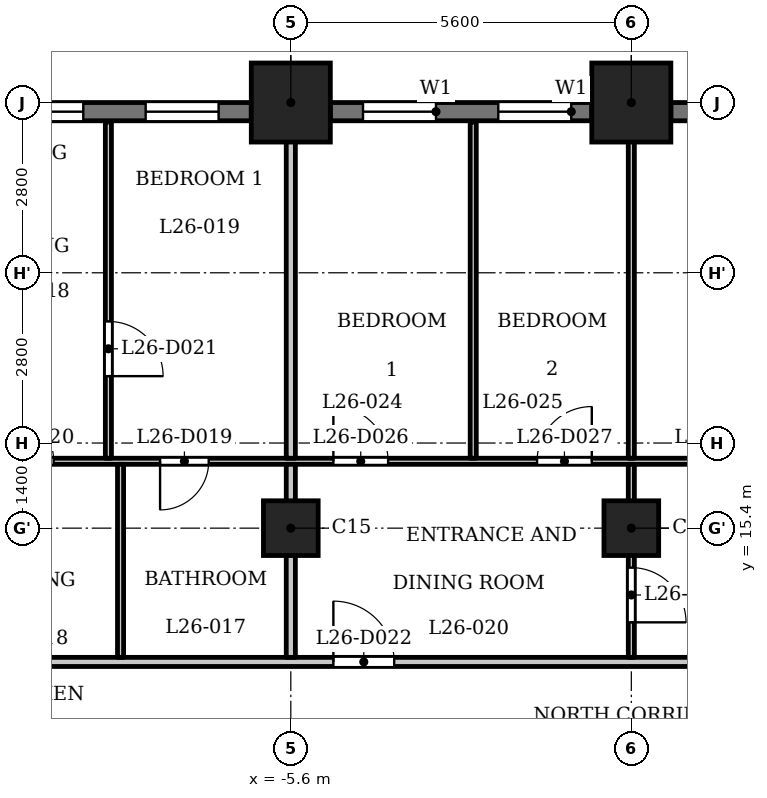
"""IFC4 building model, lengths in metres.
Left out: names, types, materials, properties, quantities, classifications, styles, units other than length and angle.
Written with IfcOpenShell. Run it as: python <this file> out.ifc"""

import sys

from ifc_helpers import new_model, si_unit, direction, frame, frame_2d, origin, origin_2d, place, context, subcontext, project, spatial, rectangle, extrude, element, fill, save


model = new_model("IFC4")
c1 = context("Model", 3, precision=1e-05, world=origin(), true_north=direction((0.0, 1.0)))
c2 = subcontext(c1, "Body", "Model", "MODEL_VIEW")
j1 = project(units=[si_unit("LENGTHUNIT", "METRE"), si_unit("PLANEANGLEUNIT", "RADIAN")], contexts=[c1])
p1 = place(None, origin())
s1 = spatial("IfcSite", under=j1, at=p1, CompositionType="ELEMENT")
p2 = place(p1, origin())
s2 = spatial("IfcBuilding", under=s1, at=p2, CompositionType="ELEMENT")
p3 = place(p2, frame((0.0, 0.0, 104.3)))
s3 = spatial("IfcBuildingStorey", under=s2, at=p3, CompositionType="ELEMENT", Elevation=104.3)
for number, where, z_axis, x_axis in (
    (1, (0.0, 22.4, 0.0), (0.0, 0.0, 1.0), (1.0, 0.0, 0.0)),
    (2, (-5.6, 22.4, 0.0), (0.0, 0.0, 1.0), (1.0, 0.0, 0.0)),
):
    element("IfcColumn", number, at=place(p3, frame(where, z_axis=z_axis, x_axis=x_axis)), inside=s3, PredefinedType="COLUMN", context=c2, shape_type="SweptSolid", body=[
        extrude(rectangle(XDim=1.3, YDim=1.3, at=origin_2d()), origin(), (0.0, 0.0, 1.0), 3.5),
    ])
for number, where, z_axis, x_axis in (
    (3, (-5.6, 15.4, 0.0), (0.0, 0.0, 1.0), (1.0, 0.0, 0.0)),
    (4, (0.0, 15.4, 0.0), (0.0, 0.0, 1.0), (1.0, 0.0, 0.0)),
):
    element("IfcColumn", number, at=place(p3, frame(where, z_axis=z_axis, x_axis=x_axis)), inside=s3, PredefinedType="COLUMN", context=c2, shape_type="SweptSolid", body=[
        extrude(rectangle(XDim=0.9, YDim=0.9, at=origin_2d()), origin(), (0.0, 0.0, 1.0), 3.5),
    ])
p4 = place(p3, frame((4.95, 22.25, 0.0), z_axis=(0.0, 0.0, 1.0), x_axis=(-1.0, 0.0, 0.0)))
e5 = element("IfcWall", 5, at=p4, inside=s3, PredefinedType="SOLIDWALL", context=c2, shape_type="SweptSolid", body=[
    extrude(rectangle(XDim=4.3, YDim=0.3, at=frame_2d((2.15, 0.0))), origin(), (0.0, 0.0, 1.0), 2.4),
])
p5 = place(p4, frame((0.35, 0.0, 1.2)))
e6 = element("IfcOpeningElement", 6, at=p5, cuts=e5, PredefinedType="OPENING", context=c2, shape_type="SweptSolid", body=[
    extrude(rectangle(XDim=3.6, YDim=0.95, at=frame_2d((1.8, 0.475))), frame((0.0, 0.16, 0.0), z_axis=(0.0, -1.0, 0.0), x_axis=(1.0, 0.0, 0.0)), (0.0, 0.0, 1.0), 0.32),
])
p6 = place(p3, frame((-0.65, 22.25, 0.0), z_axis=(0.0, 0.0, 1.0), x_axis=(-1.0, 0.0, 0.0)))
e7 = element("IfcWall", 7, at=p6, inside=s3, PredefinedType="SOLIDWALL", context=c2, shape_type="SweptSolid", body=[
    extrude(rectangle(XDim=4.3, YDim=0.3, at=frame_2d((2.15, 0.0))), origin(), (0.0, 0.0, 1.0), 2.4),
])
p7 = place(p6, frame((0.337, 0.0, 0.6)))
e8 = element("IfcOpeningElement", 8, at=p7, cuts=e7, PredefinedType="OPENING", context=c2, shape_type="SweptSolid", body=[
    extrude(rectangle(XDim=1.2, YDim=1.55, at=frame_2d((0.6, 0.775))), frame((0.0, 0.16, 0.0), z_axis=(0.0, -1.0, 0.0), x_axis=(1.0, 0.0, 0.0)), (0.0, 0.0, 1.0), 0.32),
])
p8 = place(p6, frame((2.562, 0.0, 0.6)))
e9 = element("IfcOpeningElement", 9, at=p8, cuts=e7, PredefinedType="OPENING", context=c2, shape_type="SweptSolid", body=[
    extrude(rectangle(XDim=1.2, YDim=1.55, at=frame_2d((0.6, 0.775))), frame((0.0, 0.16, 0.0), z_axis=(0.0, -1.0, 0.0), x_axis=(1.0, 0.0, 0.0)), (0.0, 0.0, 1.0), 0.32),
])
p9 = place(p3, frame((-6.25, 22.25, 0.0), z_axis=(0.0, 0.0, 1.0), x_axis=(-1.0, 0.0, 0.0)))
e10 = element("IfcWall", 10, at=p9, inside=s3, PredefinedType="SOLIDWALL", context=c2, shape_type="SweptSolid", body=[
    extrude(rectangle(XDim=4.3, YDim=0.3, at=frame_2d((2.15, 0.0))), origin(), (0.0, 0.0, 1.0), 2.4),
])
p10 = place(p9, frame((0.538, 0.0, 0.6)))
e11 = element("IfcOpeningElement", 11, at=p10, cuts=e10, PredefinedType="OPENING", context=c2, shape_type="SweptSolid", body=[
    extrude(rectangle(XDim=1.2, YDim=1.55, at=frame_2d((0.6, 0.775))), frame((0.0, 0.16, 0.0), z_axis=(0.0, -1.0, 0.0), x_axis=(1.0, 0.0, 0.0)), (0.0, 0.0, 1.0), 0.32),
])
p11 = place(p9, frame((2.762, 0.0, 0.6)))
e12 = element("IfcOpeningElement", 12, at=p11, cuts=e10, PredefinedType="OPENING", context=c2, shape_type="SweptSolid", body=[
    extrude(rectangle(XDim=1.2, YDim=1.55, at=frame_2d((0.6, 0.775))), frame((0.0, 0.16, 0.0), z_axis=(0.0, -1.0, 0.0), x_axis=(1.0, 0.0, 0.0)), (0.0, 0.0, 1.0), 0.32),
])
p12 = place(p3, frame((-17.4, 13.2, 0.0), z_axis=(0.0, 0.0, 1.0), x_axis=(1.0, 0.0, 0.0)))
e13 = element("IfcWall", 13, at=p12, inside=s3, PredefinedType="PARTITIONING", context=c2, shape_type="SweptSolid", body=[
    extrude(rectangle(XDim=34.8, YDim=0.15, at=frame_2d((17.4, 0.0))), origin(), (0.0, 0.0, 1.0), 3.2),
])
p13 = place(p12, frame((0.25, 0.0, 0.0)))
e14 = element("IfcOpeningElement", 14, at=p13, cuts=e13, PredefinedType="OPENING", context=c2, shape_type="SweptSolid", body=[
    extrude(rectangle(XDim=1.0, YDim=2.1, at=frame_2d((0.5, 1.05))), frame((0.0, 0.085, 0.0), z_axis=(0.0, -1.0, 0.0), x_axis=(1.0, 0.0, 0.0)), (0.0, 0.0, 1.0), 0.17),
])
p14 = place(p12, frame((33.65, 0.0, 0.0)))
e15 = element("IfcOpeningElement", 15, at=p14, cuts=e13, PredefinedType="OPENING", context=c2, shape_type="SweptSolid", body=[
    extrude(rectangle(XDim=1.0, YDim=2.1, at=frame_2d((0.5, 1.05))), frame((0.0, 0.085, 0.0), z_axis=(0.0, -1.0, 0.0), x_axis=(1.0, 0.0, 0.0)), (0.0, 0.0, 1.0), 0.17),
])
p15 = place(p12, frame((4.55, 0.0, 0.0)))
e16 = element("IfcOpeningElement", 16, at=p15, cuts=e13, PredefinedType="OPENING", context=c2, shape_type="SweptSolid", body=[
    extrude(rectangle(XDim=1.0, YDim=2.1, at=frame_2d((0.5, 1.05))), frame((0.0, 0.085, 0.0), z_axis=(0.0, -1.0, 0.0), x_axis=(1.0, 0.0, 0.0)), (0.0, 0.0, 1.0), 0.17),
])
p16 = place(p12, frame((6.85, 0.0, 0.0)))
e17 = element("IfcOpeningElement", 17, at=p16, cuts=e13, PredefinedType="OPENING", context=c2, shape_type="SweptSolid", body=[
    extrude(rectangle(XDim=1.0, YDim=2.1, at=frame_2d((0.5, 1.05))), frame((0.0, 0.085, 0.0), z_axis=(0.0, -1.0, 0.0), x_axis=(1.0, 0.0, 0.0)), (0.0, 0.0, 1.0), 0.17),
])
p17 = place(p12, frame((12.5, 0.0, 0.0)))
e18 = element("IfcOpeningElement", 18, at=p17, cuts=e13, PredefinedType="OPENING", context=c2, shape_type="SweptSolid", body=[
    extrude(rectangle(XDim=1.0, YDim=2.1, at=frame_2d((0.5, 1.05))), frame((0.0, 0.085, 0.0), z_axis=(0.0, -1.0, 0.0), x_axis=(1.0, 0.0, 0.0)), (0.0, 0.0, 1.0), 0.17),
])
p18 = place(p12, frame((25.7, 0.0, 0.0)))
e19 = element("IfcOpeningElement", 19, at=p18, cuts=e13, PredefinedType="OPENING", context=c2, shape_type="SweptSolid", body=[
    extrude(rectangle(XDim=1.0, YDim=2.1, at=frame_2d((0.5, 1.05))), frame((0.0, 0.085, 0.0), z_axis=(0.0, -1.0, 0.0), x_axis=(1.0, 0.0, 0.0)), (0.0, 0.0, 1.0), 0.17),
])
p19 = place(p12, frame((29.75, 0.0, 0.0)))
e20 = element("IfcOpeningElement", 20, at=p19, cuts=e13, PredefinedType="OPENING", context=c2, shape_type="SweptSolid", body=[
    extrude(rectangle(XDim=1.0, YDim=2.1, at=frame_2d((0.5, 1.05))), frame((0.0, 0.085, 0.0), z_axis=(0.0, -1.0, 0.0), x_axis=(1.0, 0.0, 0.0)), (0.0, 0.0, 1.0), 0.17),
])
p20 = place(p3, frame((-16.725, 16.5, 0.0), z_axis=(0.0, 0.0, 1.0), x_axis=(1.0, 0.0, 0.0)))
e21 = element("IfcWall", 21, at=p20, inside=s3, PredefinedType="PARTITIONING", context=c2, shape_type="SweptSolid", body=[
    extrude(rectangle(XDim=33.45, YDim=0.1, at=frame_2d((16.725, 0.0))), origin(), (0.0, 0.0, 1.0), 3.2),
])
p21 = place(p20, frame((1.075, 0.0, 0.0)))
e22 = element("IfcOpeningElement", 22, at=p21, cuts=e21, PredefinedType="OPENING", context=c2, shape_type="SweptSolid", body=[
    extrude(rectangle(XDim=0.8, YDim=2.1, at=frame_2d((0.4, 1.05))), frame((0.0, 0.06, 0.0), z_axis=(0.0, -1.0, 0.0), x_axis=(1.0, 0.0, 0.0)), (0.0, 0.0, 1.0), 0.12),
])
p22 = place(p20, frame((3.975, 0.0, 0.0)))
e23 = element("IfcOpeningElement", 23, at=p22, cuts=e21, PredefinedType="OPENING", context=c2, shape_type="SweptSolid", body=[
    extrude(rectangle(XDim=0.9, YDim=2.1, at=frame_2d((0.45, 1.05))), frame((0.0, 0.06, 0.0), z_axis=(0.0, -1.0, 0.0), x_axis=(1.0, 0.0, 0.0)), (0.0, 0.0, 1.0), 0.12),
])
p23 = place(p20, frame((8.975, 0.0, 0.0)))
e24 = element("IfcOpeningElement", 24, at=p23, cuts=e21, PredefinedType="OPENING", context=c2, shape_type="SweptSolid", body=[
    extrude(rectangle(XDim=0.8, YDim=2.1, at=frame_2d((0.4, 1.05))), frame((0.0, 0.06, 0.0), z_axis=(0.0, -1.0, 0.0), x_axis=(1.0, 0.0, 0.0)), (0.0, 0.0, 1.0), 0.12),
])
p24 = place(p20, frame((6.325, 0.0, 0.0)))
e25 = element("IfcOpeningElement", 25, at=p24, cuts=e21, PredefinedType="OPENING", context=c2, shape_type="SweptSolid", body=[
    extrude(rectangle(XDim=0.9, YDim=2.1, at=frame_2d((0.45, 1.05))), frame((0.0, 0.06, 0.0), z_axis=(0.0, -1.0, 0.0), x_axis=(1.0, 0.0, 0.0)), (0.0, 0.0, 1.0), 0.12),
])
p25 = place(p20, frame((20.725, 0.0, 0.0)))
e26 = element("IfcOpeningElement", 26, at=p25, cuts=e21, PredefinedType="OPENING", context=c2, shape_type="SweptSolid", body=[
    extrude(rectangle(XDim=0.8, YDim=2.1, at=frame_2d((0.4, 1.05))), frame((0.0, 0.06, 0.0), z_axis=(0.0, -1.0, 0.0), x_axis=(1.0, 0.0, 0.0)), (0.0, 0.0, 1.0), 0.12),
])
p26 = place(p20, frame((17.775, 0.0, 0.0)))
e27 = element("IfcOpeningElement", 27, at=p26, cuts=e21, PredefinedType="OPENING", context=c2, shape_type="SweptSolid", body=[
    extrude(rectangle(XDim=0.9, YDim=2.1, at=frame_2d((0.45, 1.05))), frame((0.0, 0.06, 0.0), z_axis=(0.0, -1.0, 0.0), x_axis=(1.0, 0.0, 0.0)), (0.0, 0.0, 1.0), 0.12),
])
p27 = place(p20, frame((11.825, 0.0, 0.0)))
e28 = element("IfcOpeningElement", 28, at=p27, cuts=e21, PredefinedType="OPENING", context=c2, shape_type="SweptSolid", body=[
    extrude(rectangle(XDim=0.9, YDim=2.1, at=frame_2d((0.45, 1.05))), frame((0.0, 0.06, 0.0), z_axis=(0.0, -1.0, 0.0), x_axis=(1.0, 0.0, 0.0)), (0.0, 0.0, 1.0), 0.12),
])
p28 = place(p20, frame((15.175, 0.0, 0.0)))
e29 = element("IfcOpeningElement", 29, at=p28, cuts=e21, PredefinedType="OPENING", context=c2, shape_type="SweptSolid", body=[
    extrude(rectangle(XDim=0.9, YDim=2.1, at=frame_2d((0.45, 1.05))), frame((0.0, 0.06, 0.0), z_axis=(0.0, -1.0, 0.0), x_axis=(1.0, 0.0, 0.0)), (0.0, 0.0, 1.0), 0.12),
])
p29 = place(p20, frame((22.975, 0.0, 0.0)))
e30 = element("IfcOpeningElement", 30, at=p29, cuts=e21, PredefinedType="OPENING", context=c2, shape_type="SweptSolid", body=[
    extrude(rectangle(XDim=0.8, YDim=2.1, at=frame_2d((0.4, 1.05))), frame((0.0, 0.06, 0.0), z_axis=(0.0, -1.0, 0.0), x_axis=(1.0, 0.0, 0.0)), (0.0, 0.0, 1.0), 0.12),
])
p30 = place(p20, frame((24.875, 0.0, 0.0)))
e31 = element("IfcOpeningElement", 31, at=p30, cuts=e21, PredefinedType="OPENING", context=c2, shape_type="SweptSolid", body=[
    extrude(rectangle(XDim=0.9, YDim=2.1, at=frame_2d((0.45, 1.05))), frame((0.0, 0.06, 0.0), z_axis=(0.0, -1.0, 0.0), x_axis=(1.0, 0.0, 0.0)), (0.0, 0.0, 1.0), 0.12),
])
p31 = place(p20, frame((32.075, 0.0, 0.0)))
e32 = element("IfcOpeningElement", 32, at=p31, cuts=e21, PredefinedType="OPENING", context=c2, shape_type="SweptSolid", body=[
    extrude(rectangle(XDim=0.8, YDim=2.1, at=frame_2d((0.4, 1.05))), frame((0.0, 0.06, 0.0), z_axis=(0.0, -1.0, 0.0), x_axis=(1.0, 0.0, 0.0)), (0.0, 0.0, 1.0), 0.12),
])
p32 = place(p20, frame((29.175, 0.0, 0.0)))
e33 = element("IfcOpeningElement", 33, at=p32, cuts=e21, PredefinedType="OPENING", context=c2, shape_type="SweptSolid", body=[
    extrude(rectangle(XDim=0.9, YDim=2.1, at=frame_2d((0.45, 1.05))), frame((0.0, 0.06, 0.0), z_axis=(0.0, -1.0, 0.0), x_axis=(1.0, 0.0, 0.0)), (0.0, 0.0, 1.0), 0.12),
])
p33 = place(p3, frame((-8.6, 16.55, 0.0), z_axis=(0.0, 0.0, 1.0), x_axis=(0.0, 1.0, 0.0)))
e34 = element("IfcWall", 34, at=p33, inside=s3, PredefinedType="PARTITIONING", context=c2, shape_type="SweptSolid", body=[
    extrude(rectangle(XDim=5.53, YDim=0.1, at=frame_2d((2.765, 0.0))), origin(), (0.0, 0.0, 1.0), 3.2),
])
p34 = place(p33, frame((1.35, 0.0, 0.0)))
e35 = element("IfcOpeningElement", 35, at=p34, cuts=e34, PredefinedType="OPENING", context=c2, shape_type="SweptSolid", body=[
    extrude(rectangle(XDim=0.9, YDim=2.1, at=frame_2d((0.45, 1.05))), frame((0.0, 0.06, 0.0), z_axis=(0.0, -1.0, 0.0), x_axis=(1.0, 0.0, 0.0)), (0.0, 0.0, 1.0), 0.12),
])
p35 = place(p3, frame((-8.4, 13.275, 0.0), z_axis=(0.0, 0.0, 1.0), x_axis=(0.0, 1.0, 0.0)))
e36 = element("IfcWall", 36, at=p35, inside=s3, PredefinedType="PARTITIONING", context=c2, shape_type="SweptSolid", body=[
    extrude(rectangle(XDim=3.175, YDim=0.1, at=frame_2d((1.587, 0.0))), origin(), (0.0, 0.0, 1.0), 3.2),
])
p36 = place(p3, frame((-5.6, 13.275, 0.0), z_axis=(0.0, 0.0, 1.0), x_axis=(0.0, 1.0, 0.0)))
e37 = element("IfcWall", 37, at=p36, inside=s3, PredefinedType="PARTITIONING", context=c2, shape_type="SweptSolid", body=[
    extrude(rectangle(XDim=3.175, YDim=0.15, at=frame_2d((1.587, 0.0))), origin(), (0.0, 0.0, 1.0), 3.2),
])
p37 = place(p3, frame((-5.6, 16.55, 0.0), z_axis=(0.0, 0.0, 1.0), x_axis=(0.0, 1.0, 0.0)))
e38 = element("IfcWall", 38, at=p37, inside=s3, PredefinedType="PARTITIONING", context=c2, shape_type="SweptSolid", body=[
    extrude(rectangle(XDim=6.48, YDim=0.15, at=frame_2d((3.24, 0.0))), origin(), (0.0, 0.0, 1.0), 3.2),
])
p38 = place(p3, frame((-2.6, 16.55, 0.0), z_axis=(0.0, 0.0, 1.0), x_axis=(0.0, 1.0, 0.0)))
e39 = element("IfcWall", 39, at=p38, inside=s3, PredefinedType="PARTITIONING", context=c2, shape_type="SweptSolid", body=[
    extrude(rectangle(XDim=5.53, YDim=0.1, at=frame_2d((2.765, 0.0))), origin(), (0.0, 0.0, 1.0), 3.2),
])
p39 = place(p3, frame((0.0, 13.275, 0.0), z_axis=(0.0, 0.0, 1.0), x_axis=(0.0, 1.0, 0.0)))
e40 = element("IfcWall", 40, at=p39, inside=s3, PredefinedType="PARTITIONING", context=c2, shape_type="SweptSolid", body=[
    extrude(rectangle(XDim=3.175, YDim=0.1, at=frame_2d((1.587, 0.0))), origin(), (0.0, 0.0, 1.0), 3.2),
])
p40 = place(p39, frame((0.576, 0.0, 0.0)))
e41 = element("IfcOpeningElement", 41, at=p40, cuts=e40, PredefinedType="OPENING", context=c2, shape_type="SweptSolid", body=[
    extrude(rectangle(XDim=0.9, YDim=2.1, at=frame_2d((0.45, 1.05))), frame((0.0, 0.06, 0.0), z_axis=(0.0, -1.0, 0.0), x_axis=(1.0, 0.0, 0.0)), (0.0, 0.0, 1.0), 0.12),
])
p41 = place(p3, frame((0.0, 16.55, 0.0), z_axis=(0.0, 0.0, 1.0), x_axis=(0.0, 1.0, 0.0)))
e42 = element("IfcWall", 42, at=p41, inside=s3, PredefinedType="PARTITIONING", context=c2, shape_type="SweptSolid", body=[
    extrude(rectangle(XDim=6.48, YDim=0.1, at=frame_2d((3.24, 0.0))), origin(), (0.0, 0.0, 1.0), 3.2),
])
p42 = place(p23, origin())
e43 = element("IfcDoor", 43, at=p42, inside=s3, OperationType="SINGLE_SWING_LEFT", PredefinedType="DOOR", context=c2, shape_type="SweptSolid", body=[
    extrude(rectangle(XDim=0.8, YDim=2.1, at=frame_2d((0.4, 1.05))), frame((0.0, 0.025, 0.0), z_axis=(0.0, -1.0, 0.0), x_axis=(1.0, 0.0, 0.0)), (0.0, 0.0, 1.0), 0.05),
])
fill(e24, e43)
p43 = place(p24, origin())
e44 = element("IfcDoor", 44, at=p43, inside=s3, OperationType="SINGLE_SWING_RIGHT", PredefinedType="DOOR", context=c2, shape_type="SweptSolid", body=[
    extrude(rectangle(XDim=0.9, YDim=2.1, at=frame_2d((0.45, 1.05))), frame((0.0, 0.025, 0.0), z_axis=(0.0, -1.0, 0.0), x_axis=(1.0, 0.0, 0.0)), (0.0, 0.0, 1.0), 0.05),
])
fill(e25, e44)
p44 = place(p34, origin())
e45 = element("IfcDoor", 45, at=p44, inside=s3, OperationType="SINGLE_SWING_LEFT", PredefinedType="DOOR", context=c2, shape_type="SweptSolid", body=[
    extrude(rectangle(XDim=0.9, YDim=2.1, at=frame_2d((0.45, 1.05))), frame((0.0, 0.025, 0.0), z_axis=(0.0, -1.0, 0.0), x_axis=(1.0, 0.0, 0.0)), (0.0, 0.0, 1.0), 0.05),
])
fill(e35, e45)
p45 = place(p17, origin())
e46 = element("IfcDoor", 46, at=p45, inside=s3, OperationType="SINGLE_SWING_RIGHT", PredefinedType="DOOR", context=c2, shape_type="SweptSolid", body=[
    extrude(rectangle(XDim=1.0, YDim=2.1, at=frame_2d((0.5, 1.05))), frame((0.0, 0.025, 0.0), z_axis=(0.0, -1.0, 0.0), x_axis=(1.0, 0.0, 0.0)), (0.0, 0.0, 1.0), 0.05),
])
fill(e18, e46)
p46 = place(p40, origin())
e47 = element("IfcDoor", 47, at=p46, inside=s3, OperationType="SINGLE_SWING_LEFT", PredefinedType="DOOR", context=c2, shape_type="SweptSolid", body=[
    extrude(rectangle(XDim=0.9, YDim=2.1, at=frame_2d((0.45, 1.05))), frame((0.0, 0.025, 0.0), z_axis=(0.0, -1.0, 0.0), x_axis=(1.0, 0.0, 0.0)), (0.0, 0.0, 1.0), 0.05),
])
fill(e41, e47)
p47 = place(p27, origin())
e48 = element("IfcDoor", 48, at=p47, inside=s3, OperationType="SINGLE_SWING_RIGHT", PredefinedType="DOOR", context=c2, shape_type="SweptSolid", body=[
    extrude(rectangle(XDim=0.9, YDim=2.1, at=frame_2d((0.45, 1.05))), frame((0.0, 0.025, 0.0), z_axis=(0.0, -1.0, 0.0), x_axis=(1.0, 0.0, 0.0)), (0.0, 0.0, 1.0), 0.05),
])
fill(e28, e48)
p48 = place(p28, origin())
e49 = element("IfcDoor", 49, at=p48, inside=s3, OperationType="SINGLE_SWING_LEFT", PredefinedType="DOOR", context=c2, shape_type="SweptSolid", body=[
    extrude(rectangle(XDim=0.9, YDim=2.1, at=frame_2d((0.45, 1.05))), frame((0.0, 0.025, 0.0), z_axis=(0.0, -1.0, 0.0), x_axis=(1.0, 0.0, 0.0)), (0.0, 0.0, 1.0), 0.05),
])
fill(e29, e49)
p49 = place(p7, origin())
e50 = element("IfcWindow", 50, at=p49, inside=s3, PartitioningType="SINGLE_PANEL", PredefinedType="WINDOW", context=c2, shape_type="SweptSolid", body=[
    extrude(rectangle(XDim=1.2, YDim=1.55, at=frame_2d((0.6, 0.775))), frame((0.0, 0.03, 0.0), z_axis=(0.0, -1.0, 0.0), x_axis=(1.0, 0.0, 0.0)), (0.0, 0.0, 1.0), 0.06),
])
fill(e8, e50)
p50 = place(p8, origin())
e51 = element("IfcWindow", 51, at=p50, inside=s3, PartitioningType="SINGLE_PANEL", PredefinedType="WINDOW", context=c2, shape_type="SweptSolid", body=[
    extrude(rectangle(XDim=1.2, YDim=1.55, at=frame_2d((0.6, 0.775))), frame((0.0, 0.03, 0.0), z_axis=(0.0, -1.0, 0.0), x_axis=(1.0, 0.0, 0.0)), (0.0, 0.0, 1.0), 0.06),
])
fill(e9, e51)
p51 = place(p10, origin())
e52 = element("IfcWindow", 52, at=p51, inside=s3, PartitioningType="SINGLE_PANEL", PredefinedType="WINDOW", context=c2, shape_type="SweptSolid", body=[
    extrude(rectangle(XDim=1.2, YDim=1.55, at=frame_2d((0.6, 0.775))), frame((0.0, 0.03, 0.0), z_axis=(0.0, -1.0, 0.0), x_axis=(1.0, 0.0, 0.0)), (0.0, 0.0, 1.0), 0.06),
])
fill(e11, e52)
p52 = place(p11, origin())
e53 = element("IfcWindow", 53, at=p52, inside=s3, PartitioningType="SINGLE_PANEL", PredefinedType="WINDOW", context=c2, shape_type="SweptSolid", body=[
    extrude(rectangle(XDim=1.2, YDim=1.55, at=frame_2d((0.6, 0.775))), frame((0.0, 0.03, 0.0), z_axis=(0.0, -1.0, 0.0), x_axis=(1.0, 0.0, 0.0)), (0.0, 0.0, 1.0), 0.06),
])
fill(e12, e53)
save(model, sys.argv[1])
